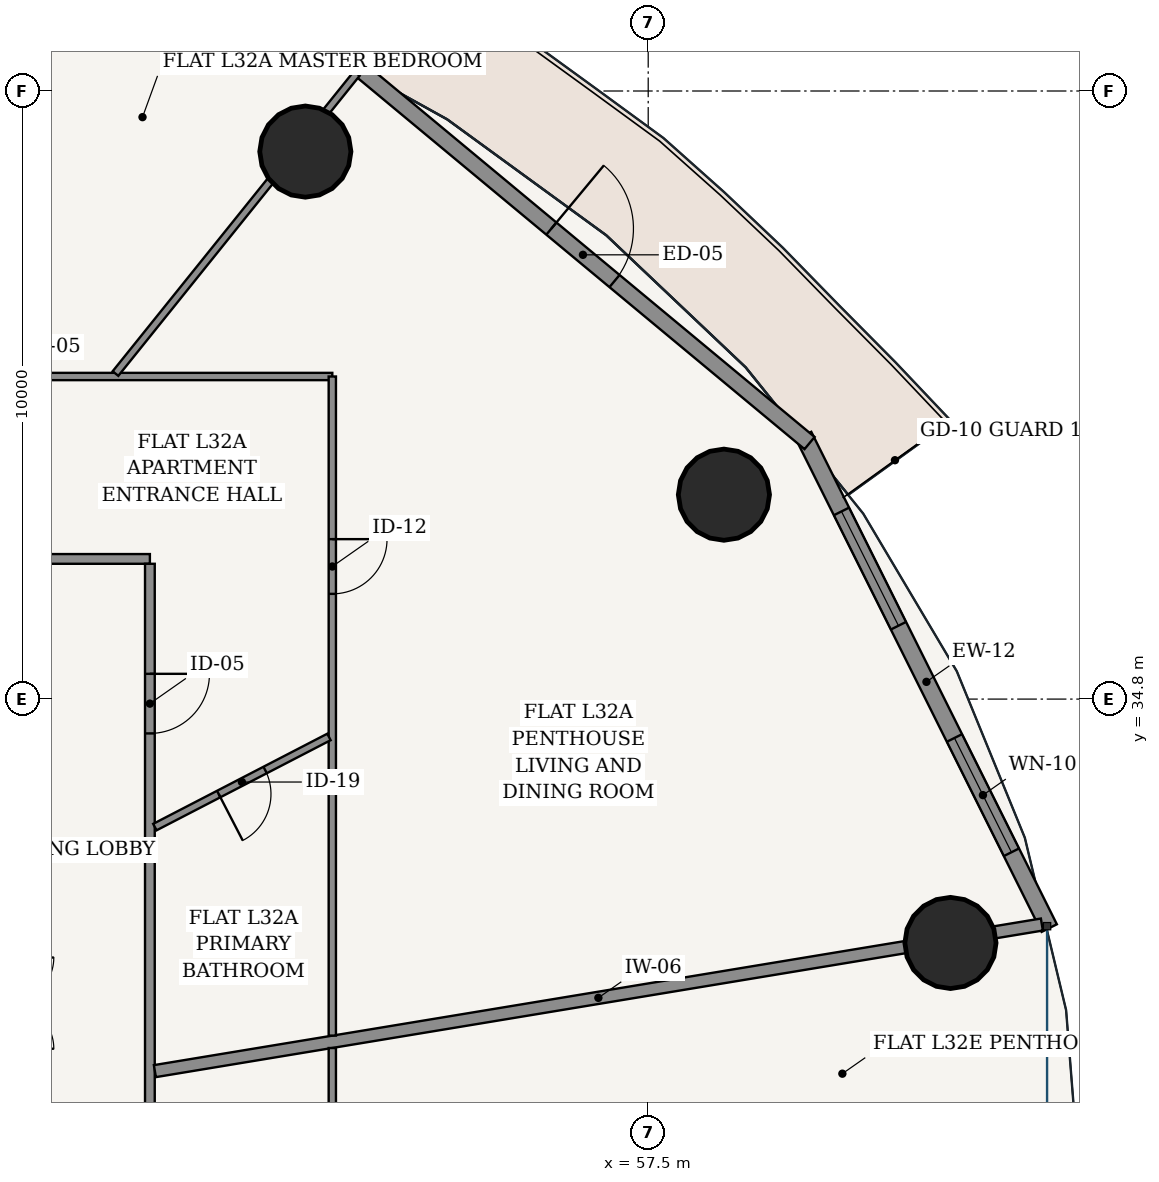
"""IFC4 building model, lengths in metres.
Left out: names, types, materials, properties, quantities, classifications, styles, units other than length and angle.
Written with IfcOpenShell. Run it as: python <this file> out.ifc"""

import sys

from ifc_helpers import new_model, si_unit, direction, frame, frame_2d, origin, origin_2d, place, context, subcontext, project, spatial, rectangle, hollow_circle, extrude, source, transform, mapped, element, fill, save


model = new_model("IFC4")
c1 = context("Model", 3, precision=1e-05, world=origin(), true_north=direction((-0.2419218956, 0.970295726276)))
c2 = subcontext(c1, "Body", "Model", "MODEL_VIEW")
j1 = project(units=[si_unit("LENGTHUNIT", "METRE"), si_unit("PLANEANGLEUNIT", "RADIAN")], contexts=[c1])
p1 = place(None, origin())
s1 = spatial("IfcSite", under=j1, at=p1, CompositionType="ELEMENT")
p2 = place(p1, origin())
s2 = spatial("IfcBuilding", under=s1, at=p2, CompositionType="ELEMENT")
p3 = place(p2, frame((0.0, 0.0, 123.0)))
s3 = spatial("IfcBuildingStorey", under=s2, at=p3, CompositionType="ELEMENT", Elevation=123.0)
for number, where, z_axis, x_axis in (
    (1, (62.471, 30.79, 0.0), (0.0, 0.0, 1.0), (1.0, 0.0, 0.0)),
    (2, (58.745, 38.161, 0.0), (0.0, 0.0, 1.0), (1.0, 0.0, 0.0)),
    (3, (51.862, 43.803, 0.0), (0.0, 0.0, 1.0), (1.0, 0.0, 0.0)),
):
    element("IfcColumn", number, at=place(p3, frame(where, z_axis=z_axis, x_axis=x_axis)), inside=s3, PredefinedType="COLUMN", context=c2, shape_type="SweptSolid", body=[
        extrude(hollow_circle(Radius=0.75, WallThickness=0.045, at=origin_2d()), origin(), (0.0, 0.0, 1.0), 3.6),
    ])
p4 = place(p3, frame((64.095, 31.034, 0.0), z_axis=(0.0, 0.0, 1.0), x_axis=(-0.446263788661, 0.894901464369, 0.0)))
e4 = element("IfcWall", 4, at=p4, inside=s3, PredefinedType="SOLIDWALL", context=c2, shape_type="SweptSolid", body=[
    extrude(rectangle(XDim=9.05, YDim=0.28, at=frame_2d((4.525, 0.0))), origin(), (0.0, 0.0, 1.0), 3.325),
])
p5 = place(p4, frame((1.394, 0.0, 0.85)))
e5 = element("IfcOpeningElement", 5, at=p5, cuts=e4, PredefinedType="OPENING", context=c2, shape_type="SweptSolid", body=[
    extrude(rectangle(XDim=2.1, YDim=1.95, at=frame_2d((1.05, 0.975))), frame((0.0, 0.15, 0.0), z_axis=(0.0, -1.0, 0.0), x_axis=(1.0, 0.0, 0.0)), (0.0, 0.0, 1.0), 0.3),
])
p6 = place(p4, frame((5.557, 0.0, 0.85)))
e6 = element("IfcOpeningElement", 6, at=p6, cuts=e4, PredefinedType="OPENING", context=c2, shape_type="SweptSolid", body=[
    extrude(rectangle(XDim=2.1, YDim=1.95, at=frame_2d((1.05, 0.975))), frame((0.0, 0.15, 0.0), z_axis=(0.0, -1.0, 0.0), x_axis=(1.0, 0.0, 0.0)), (0.0, 0.0, 1.0), 0.3),
])
p7 = place(p3, frame((60.154, 39.01, 0.0), z_axis=(0.0, 0.0, 1.0), x_axis=(-0.769242574941, 0.638956853706, 0.0)))
e7 = element("IfcWall", 7, at=p7, inside=s3, PredefinedType="SOLIDWALL", context=c2, shape_type="SweptSolid", body=[
    extrude(rectangle(XDim=9.69, YDim=0.26, at=frame_2d((4.845, 0.0))), origin(), (0.0, 0.0, 1.0), 3.325),
])
p8 = place(p7, frame((4.17, 0.0, 0.0)))
e8 = element("IfcOpeningElement", 8, at=p8, cuts=e7, PredefinedType="OPENING", context=c2, shape_type="SweptSolid", body=[
    extrude(rectangle(XDim=1.35, YDim=2.2, at=frame_2d((0.675, 1.1))), frame((0.0, 0.14, 0.0), z_axis=(0.0, -1.0, 0.0), x_axis=(1.0, 0.0, 0.0)), (0.0, 0.0, 1.0), 0.28),
])
p9 = place(p3, frame((26.695, 37.105, 0.0), z_axis=(0.0, 0.0, 1.0), x_axis=(1.0, 0.0, 0.0)))
e9 = element("IfcWall", 9, at=p9, inside=s3, PredefinedType="PARTITIONING", context=c2, shape_type="SweptSolid", body=[
    extrude(rectangle(XDim=22.61, YDim=0.16, at=frame_2d((11.305, 0.0))), origin(), (0.0, 0.0, 1.0), 2.767),
])
p10 = place(p9, frame((4.925, 0.0, 0.0)))
e10 = element("IfcOpeningElement", 10, at=p10, cuts=e9, PredefinedType="OPENING", context=c2, shape_type="SweptSolid", body=[
    extrude(rectangle(XDim=0.98, YDim=2.2, at=frame_2d((0.49, 1.1))), frame((0.0, 0.09, 0.0), z_axis=(0.0, -1.0, 0.0), x_axis=(1.0, 0.0, 0.0)), (0.0, 0.0, 1.0), 0.18),
])
p11 = place(p3, frame((49.305, 16.575, 0.0), z_axis=(0.0, 0.0, 1.0), x_axis=(0.0, 1.0, 0.0)))
e11 = element("IfcWall", 11, at=p11, inside=s3, PredefinedType="PARTITIONING", context=c2, shape_type="SweptSolid", body=[
    extrude(rectangle(XDim=20.45, YDim=0.16, at=frame_2d((10.225, 0.0))), origin(), (0.0, 0.0, 1.0), 2.767),
])
p12 = place(p11, frame((17.66, 0.0, 0.0)))
e12 = element("IfcOpeningElement", 12, at=p12, cuts=e11, PredefinedType="OPENING", context=c2, shape_type="SweptSolid", body=[
    extrude(rectangle(XDim=0.98, YDim=2.2, at=frame_2d((0.49, 1.1))), frame((0.0, 0.09, 0.0), z_axis=(0.0, -1.0, 0.0), x_axis=(1.0, 0.0, 0.0)), (0.0, 0.0, 1.0), 0.18),
])
p13 = place(p11, frame((1.374, 0.0, 0.0)))
e13 = element("IfcOpeningElement", 13, at=p13, cuts=e11, PredefinedType="OPENING", context=c2, shape_type="SweptSolid", body=[
    extrude(rectangle(XDim=0.98, YDim=2.2, at=frame_2d((0.49, 1.1))), frame((0.0, 0.09, 0.0), z_axis=(0.0, -1.0, 0.0), x_axis=(1.0, 0.0, 0.0)), (0.0, 0.0, 1.0), 0.18),
])
p14 = place(p3, frame((49.387, 28.682, 0.0), z_axis=(0.0, 0.0, 1.0), x_axis=(0.986617934215, 0.163049231479, 0.0)))
e14 = element("IfcWall", 14, at=p14, inside=s3, PredefinedType="PARTITIONING", context=c2, shape_type="SweptSolid", body=[
    extrude(rectangle(XDim=14.785, YDim=0.2, at=frame_2d((7.392, 0.0))), origin(), (0.0, 0.0, 1.0), 2.767),
])
p15 = place(p3, frame((41.287, 40.105, 0.0), z_axis=(0.0, 0.0, 1.0), x_axis=(1.0, 0.0, 0.0)))
e15 = element("IfcWall", 15, at=p15, inside=s3, PredefinedType="PARTITIONING", context=c2, shape_type="SweptSolid", body=[
    extrude(rectangle(XDim=11.018, YDim=0.12, at=frame_2d((5.509, 0.0))), origin(), (0.0, 0.0, 1.0), 2.767),
])
p16 = place(p15, frame((1.357, 0.0, 0.0)))
e16 = element("IfcOpeningElement", 16, at=p16, cuts=e15, PredefinedType="OPENING", context=c2, shape_type="SweptSolid", body=[
    extrude(rectangle(XDim=0.9, YDim=2.15, at=frame_2d((0.45, 1.075))), frame((0.0, 0.07, 0.0), z_axis=(0.0, -1.0, 0.0), x_axis=(1.0, 0.0, 0.0)), (0.0, 0.0, 1.0), 0.14),
])
p17 = place(p3, frame((52.305, 40.105, 0.0), z_axis=(0.0, 0.0, 1.0), x_axis=(0.0, -1.0, 0.0)))
e17 = element("IfcWall", 17, at=p17, inside=s3, PredefinedType="PARTITIONING", context=c2, shape_type="SweptSolid", body=[
    extrude(rectangle(XDim=10.839, YDim=0.12, at=frame_2d((5.419, 0.0))), origin(), (0.0, 0.0, 1.0), 2.767),
])
p18 = place(p17, frame((2.675, 0.0, 0.0)))
e18 = element("IfcOpeningElement", 18, at=p18, cuts=e17, PredefinedType="OPENING", context=c2, shape_type="SweptSolid", body=[
    extrude(rectangle(XDim=0.9, YDim=2.15, at=frame_2d((0.45, 1.075))), frame((0.0, 0.07, 0.0), z_axis=(0.0, -1.0, 0.0), x_axis=(1.0, 0.0, 0.0)), (0.0, 0.0, 1.0), 0.14),
])
p19 = place(p3, frame((48.739, 40.153, 0.0), z_axis=(0.0, 0.0, 1.0), x_axis=(0.626714875168, 0.779248654309, 0.0)))
e19 = element("IfcWall", 19, at=p19, inside=s3, PredefinedType="PARTITIONING", context=c2, shape_type="SweptSolid", body=[
    extrude(rectangle(XDim=6.332, YDim=0.12, at=frame_2d((3.166, 0.0))), origin(), (0.0, 0.0, 1.0), 2.767),
])
p20 = place(p3, frame((44.661, 40.16, 0.0), z_axis=(0.0, 0.0, 1.0), x_axis=(0.446177198157, 0.894944639542, 0.0)))
e20 = element("IfcWall", 20, at=p20, inside=s3, PredefinedType="PARTITIONING", context=c2, shape_type="SweptSolid", body=[
    extrude(rectangle(XDim=7.823, YDim=0.12, at=frame_2d((3.912, 0.0))), origin(), (0.0, 0.0, 1.0), 2.767),
])
p21 = place(p20, frame((3.461, 0.0, 0.0)))
e21 = element("IfcOpeningElement", 21, at=p21, cuts=e20, PredefinedType="OPENING", context=c2, shape_type="SweptSolid", body=[
    extrude(rectangle(XDim=0.9, YDim=2.15, at=frame_2d((0.45, 1.075))), frame((0.0, 0.07, 0.0), z_axis=(0.0, -1.0, 0.0), x_axis=(1.0, 0.0, 0.0)), (0.0, 0.0, 1.0), 0.14),
])
p22 = place(p3, frame((49.387, 32.695, 0.0), z_axis=(0.0, 0.0, 1.0), x_axis=(0.888069491277, 0.459709232737, 0.0)))
e22 = element("IfcWall", 22, at=p22, inside=s3, PredefinedType="PARTITIONING", context=c2, shape_type="SweptSolid", body=[
    extrude(rectangle(XDim=3.224, YDim=0.12, at=frame_2d((1.612, 0.0))), origin(), (0.0, 0.0, 1.0), 3.325),
])
p23 = place(p22, frame((1.182, 0.0, 0.0)))
e23 = element("IfcOpeningElement", 23, at=p23, cuts=e22, PredefinedType="OPENING", context=c2, shape_type="SweptSolid", body=[
    extrude(rectangle(XDim=0.86, YDim=2.15, at=frame_2d((0.43, 1.075))), frame((0.0, 0.07, 0.0), z_axis=(0.0, -1.0, 0.0), x_axis=(1.0, 0.0, 0.0)), (0.0, 0.0, 1.0), 0.14),
])
p24 = place(p3, frame((52.305, 29.062, 0.0), z_axis=(0.0, 0.0, 1.0), x_axis=(0.0, -1.0, 0.0)))
e24 = element("IfcWall", 24, at=p24, inside=s3, PredefinedType="PARTITIONING", context=c2, shape_type="SweptSolid", body=[
    extrude(rectangle(XDim=15.567, YDim=0.12, at=frame_2d((7.783, 0.0))), origin(), (0.0, 0.0, 1.0), 2.767),
])
p25 = place(p24, frame((12.535, 0.0, 0.0)))
e25 = element("IfcOpeningElement", 25, at=p25, cuts=e24, PredefinedType="OPENING", context=c2, shape_type="SweptSolid", body=[
    extrude(rectangle(XDim=0.9, YDim=2.15, at=frame_2d((0.45, 1.075))), frame((0.0, 0.07, 0.0), z_axis=(0.0, -1.0, 0.0), x_axis=(1.0, 0.0, 0.0)), (0.0, 0.0, 1.0), 0.14),
])
p26 = place(p24, frame((2.582, 0.0, 0.0)))
e26 = element("IfcOpeningElement", 26, at=p26, cuts=e24, PredefinedType="OPENING", context=c2, shape_type="SweptSolid", body=[
    extrude(rectangle(XDim=0.9, YDim=2.15, at=frame_2d((0.45, 1.075))), frame((0.0, 0.07, 0.0), z_axis=(0.0, -1.0, 0.0), x_axis=(1.0, 0.0, 0.0)), (0.0, 0.0, 1.0), 0.14),
])
m1 = source(origin(), c2, "Body", "SweptSolid", [
    extrude(rectangle(XDim=2.1, YDim=1.95, at=frame_2d((1.05, 0.975))), frame((0.0, 0.03, 0.0), z_axis=(0.0, -1.0, 0.0), x_axis=(1.0, 0.0, 0.0)), (0.0, 0.0, 1.0), 0.06),
])
p27 = place(p5, origin())
e27 = element("IfcWindow", 27, at=p27, inside=s3, PartitioningType="SINGLE_PANEL", PredefinedType="WINDOW", context=c2, shape_type="MappedRepresentation", body=[
    mapped(m1, transform((0.0, 0.0, 0.0), scale=1.0)),
])
fill(e5, e27)
p28 = place(p6, origin())
e28 = element("IfcWindow", 28, at=p28, inside=s3, PartitioningType="SINGLE_PANEL", PredefinedType="WINDOW", context=c2, shape_type="MappedRepresentation", body=[
    mapped(m1, transform((0.0, 0.0, 0.0), scale=1.0)),
])
fill(e6, e28)
m2 = source(origin(), c2, "Body", "SweptSolid", [
    extrude(rectangle(XDim=1.35, YDim=2.2, at=frame_2d((0.675, 1.1))), frame((0.0, 0.025, 0.0), z_axis=(0.0, -1.0, 0.0), x_axis=(1.0, 0.0, 0.0)), (0.0, 0.0, 1.0), 0.05),
])
p29 = place(p8, frame((1.35, 0.0, 0.0), z_axis=(0.0, 0.0, 1.0), x_axis=(-1.0, 0.0, 0.0)))
e29 = element("IfcDoor", 29, at=p29, inside=s3, OperationType="SINGLE_SWING_LEFT", PredefinedType="DOOR", context=c2, shape_type="MappedRepresentation", body=[
    mapped(m2, transform((0.0, 0.0, 0.0), scale=1.0)),
])
fill(e8, e29)
m3 = source(origin(), c2, "Body", "SweptSolid", [
    extrude(rectangle(XDim=0.98, YDim=2.2, at=frame_2d((0.49, 1.1))), frame((0.0, 0.025, 0.0), z_axis=(0.0, -1.0, 0.0), x_axis=(1.0, 0.0, 0.0)), (0.0, 0.0, 1.0), 0.05),
])
p30 = place(p12, frame((0.98, 0.0, 0.0), z_axis=(0.0, 0.0, 1.0), x_axis=(-1.0, 0.0, 0.0)))
e30 = element("IfcDoor", 30, at=p30, inside=s3, OperationType="SINGLE_SWING_LEFT", PredefinedType="DOOR", context=c2, shape_type="MappedRepresentation", body=[
    mapped(m3, transform((0.0, 0.0, 0.0), scale=1.0)),
])
fill(e12, e30)
m4 = source(origin(), c2, "Body", "SweptSolid", [
    extrude(rectangle(XDim=0.86, YDim=2.15, at=frame_2d((0.43, 1.075))), frame((0.0, 0.025, 0.0), z_axis=(0.0, -1.0, 0.0), x_axis=(1.0, 0.0, 0.0)), (0.0, 0.0, 1.0), 0.05),
])
p31 = place(p23, frame((0.86, 0.0, 0.0), z_axis=(0.0, 0.0, 1.0), x_axis=(-1.0, 0.0, 0.0)))
e31 = element("IfcDoor", 31, at=p31, inside=s3, OperationType="SINGLE_SWING_RIGHT", PredefinedType="DOOR", context=c2, shape_type="MappedRepresentation", body=[
    mapped(m4, transform((0.0, 0.0, 0.0), scale=1.0)),
])
fill(e23, e31)
m5 = source(origin(), c2, "Body", "SweptSolid", [
    extrude(rectangle(XDim=0.9, YDim=2.15, at=frame_2d((0.45, 1.075))), frame((0.0, 0.025, 0.0), z_axis=(0.0, -1.0, 0.0), x_axis=(1.0, 0.0, 0.0)), (0.0, 0.0, 1.0), 0.05),
])
p32 = place(p18, origin())
e32 = element("IfcDoor", 32, at=p32, inside=s3, OperationType="SINGLE_SWING_LEFT", PredefinedType="DOOR", context=c2, shape_type="MappedRepresentation", body=[
    mapped(m5, transform((0.0, 0.0, 0.0), scale=1.0)),
])
fill(e18, e32)
save(model, sys.argv[1])
